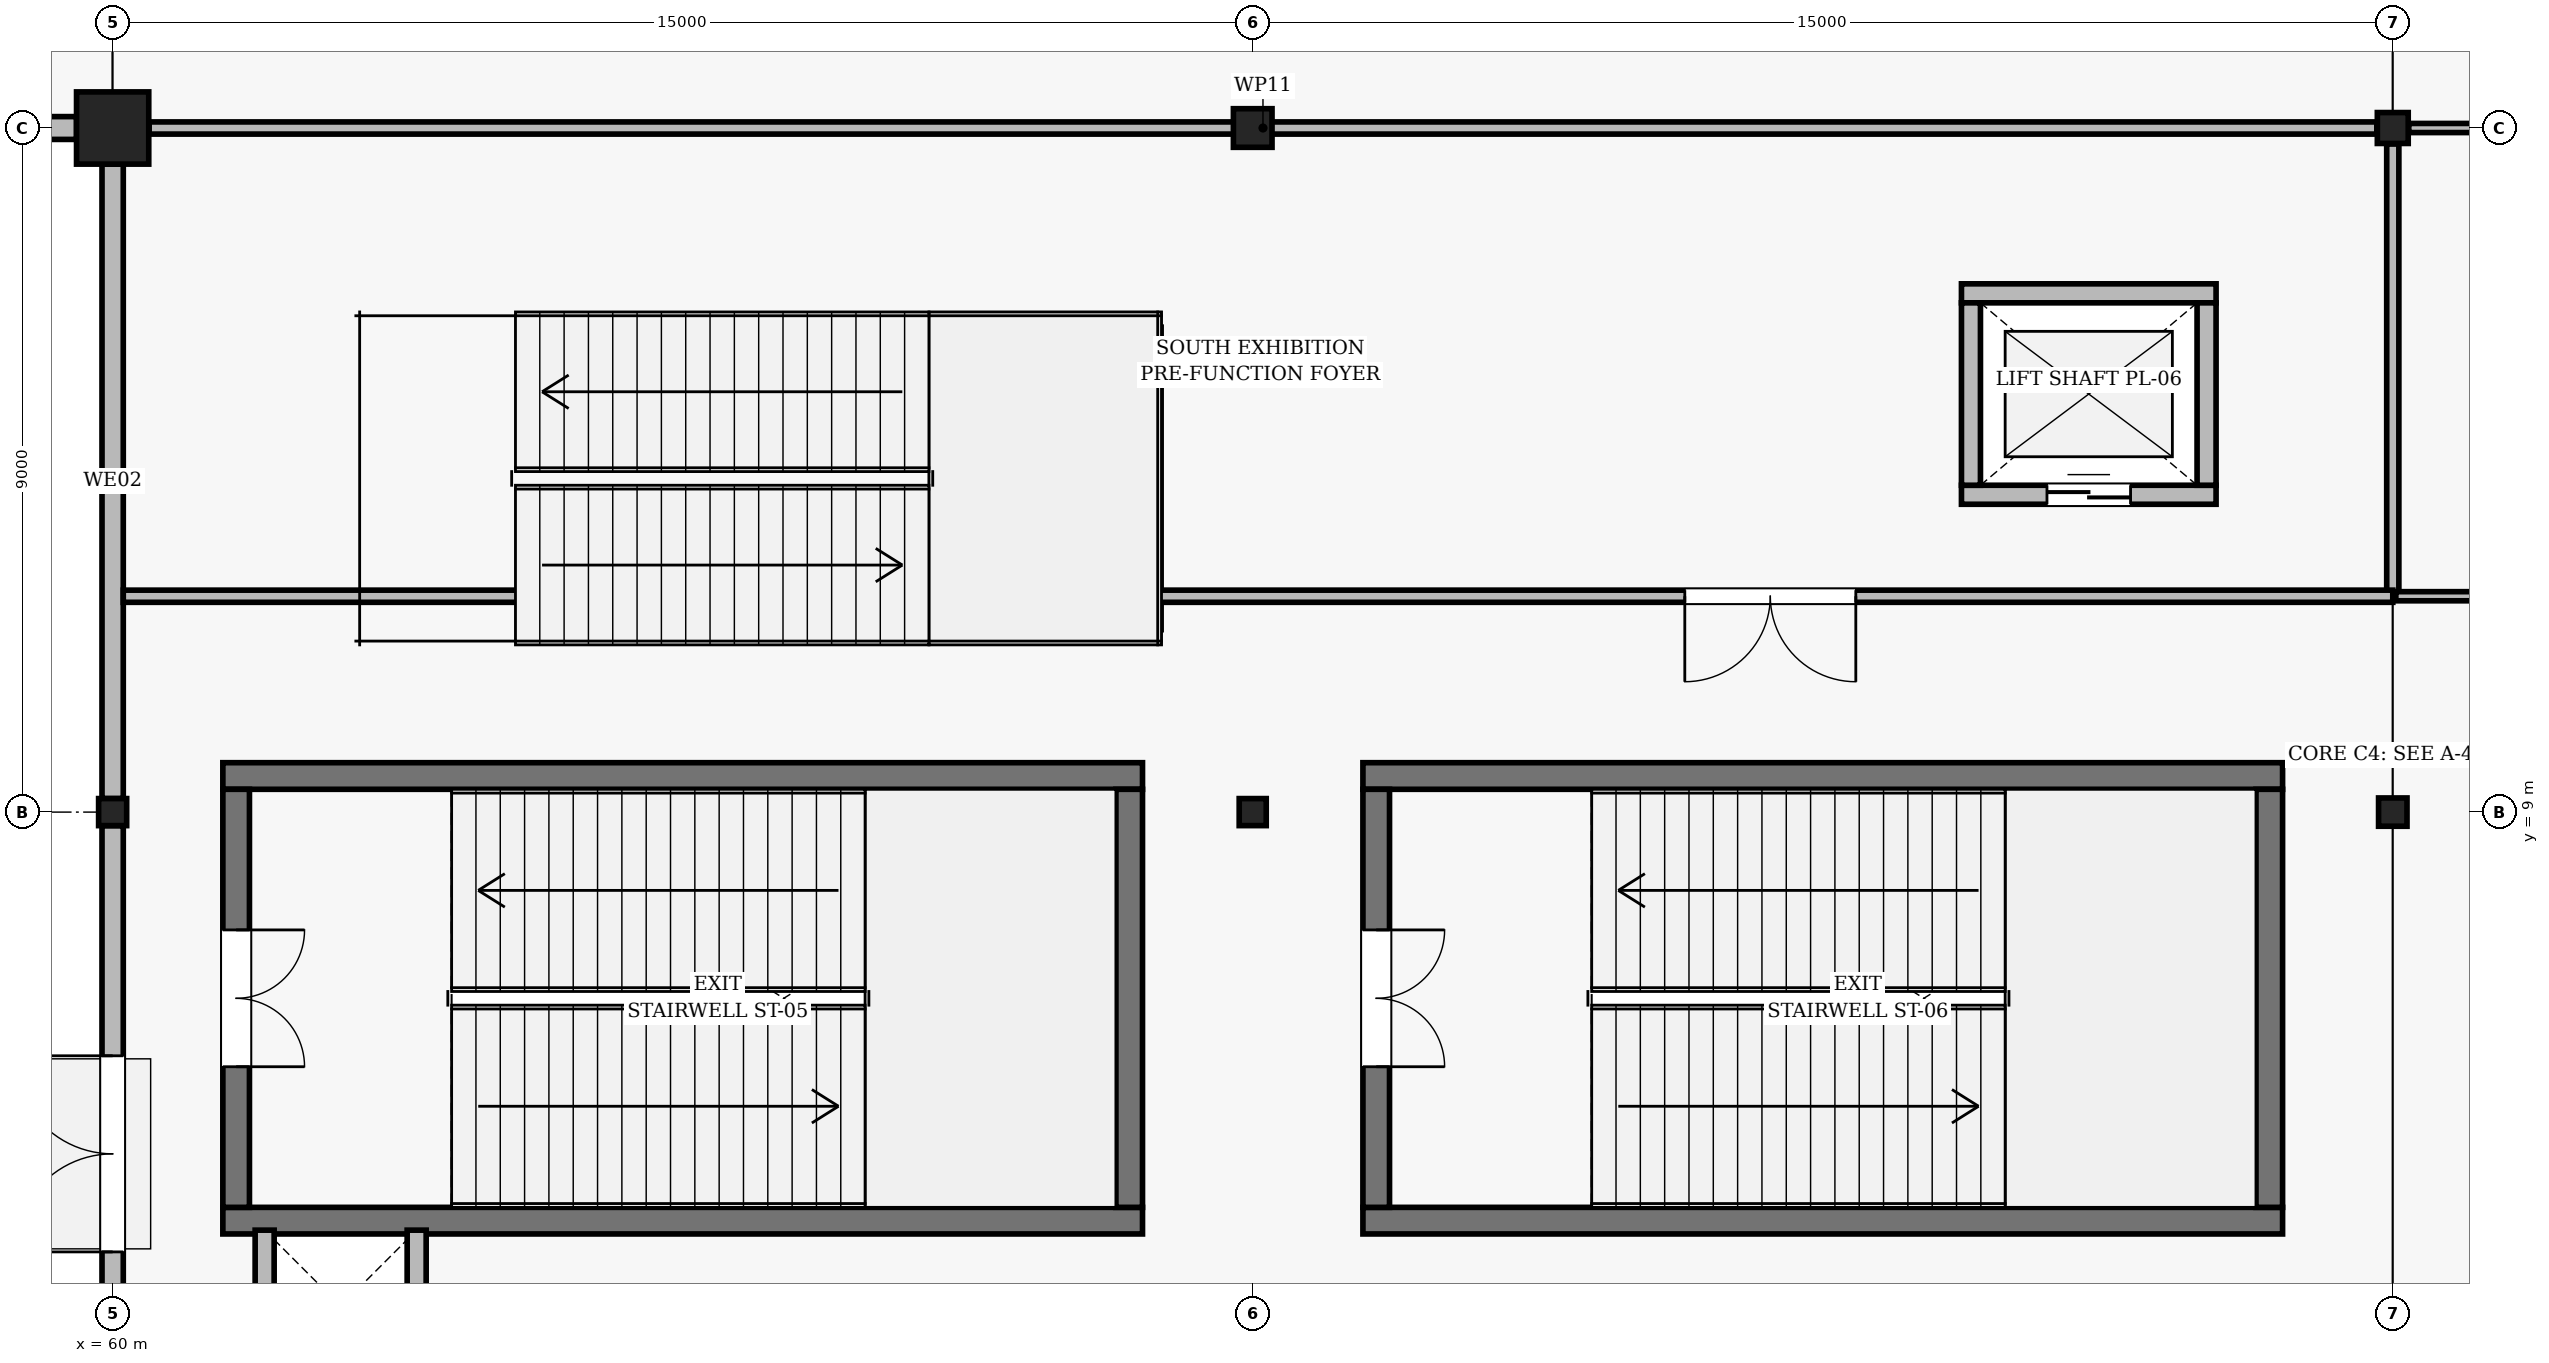
"""IFC4 building model, lengths in metres.
Left out: names, types, materials, properties, quantities, classifications, styles, units other than length and angle.
Written with IfcOpenShell. Run it as: python <this file> out.ifc"""

import sys

from ifc_helpers import new_model, si_unit, direction, frame, frame_2d, origin, origin_2d, place, context, subcontext, project, spatial, rectangle, hollow_circle, i_section, extrude, element, fill, save


model = new_model("IFC4")
c1 = context("Model", 3, precision=1e-05, world=origin(), true_north=direction((0.0, 1.0)))
c2 = subcontext(c1, "Body", "Model", "MODEL_VIEW")
j1 = project(units=[si_unit("LENGTHUNIT", "METRE"), si_unit("PLANEANGLEUNIT", "RADIAN")], contexts=[c1])
p1 = place(None, origin())
s1 = spatial("IfcSite", under=j1, at=p1, CompositionType="ELEMENT")
p2 = place(p1, origin())
s2 = spatial("IfcBuilding", under=s1, at=p2, CompositionType="ELEMENT")
p3 = place(p2, origin())
s3 = spatial("IfcBuildingStorey", under=s2, at=p3, CompositionType="ELEMENT", Elevation=0.0)
p4 = place(p3, frame((60.0, 9.0, 0.0), z_axis=(0.0, 0.0, 1.0), x_axis=(1.0, 0.0, 0.0)))
e1 = element("IfcColumn", 1, at=p4, inside=s3, PredefinedType="COLUMN", context=c2, shape_type="SweptSolid", body=[
    extrude(i_section(OverallWidth=0.369, OverallDepth=0.356, WebThickness=0.011, FlangeThickness=0.018, FilletRadius=0.015, at=origin_2d()), origin(), (0.0, 0.0, 1.0), 5.4),
])
p5 = place(p3, frame((60.0, 18.0, 0.0), z_axis=(0.0, 0.0, 1.0), x_axis=(1.0, 0.0, 0.0)))
e2 = element("IfcColumn", 2, at=p5, inside=s3, PredefinedType="COLUMN", context=c2, shape_type="SweptSolid", body=[
    extrude(rectangle(XDim=0.95, YDim=0.95, at=origin_2d()), origin(), (0.0, 0.0, 1.0), 5.4),
])
p6 = place(p3, frame((75.0, 9.0, 0.0), z_axis=(0.0, 0.0, 1.0), x_axis=(1.0, 0.0, 0.0)))
e3 = element("IfcColumn", 3, at=p6, inside=s3, PredefinedType="COLUMN", context=c2, shape_type="SweptSolid", body=[
    extrude(hollow_circle(Radius=0.178, WallThickness=0.016, at=origin_2d()), origin(), (0.0, 0.0, 1.0), 5.4),
])
p7 = place(p3, frame((75.0, 18.0, 0.0), z_axis=(0.0, 0.0, 1.0), x_axis=(1.0, 0.0, 0.0)))
e4 = element("IfcColumn", 4, at=p7, inside=s3, PredefinedType="COLUMN", context=c2, shape_type="SweptSolid", body=[
    extrude(hollow_circle(Radius=0.254, WallThickness=0.02, at=origin_2d()), origin(), (0.0, 0.0, 1.0), 5.4),
])
p8 = place(p3, frame((90.0, 9.0, 0.0), z_axis=(0.0, 0.0, 1.0), x_axis=(1.0, 0.0, 0.0)))
e5 = element("IfcColumn", 5, at=p8, inside=s3, PredefinedType="COLUMN", context=c2, shape_type="SweptSolid", body=[
    extrude(i_section(OverallWidth=0.374, OverallDepth=0.372, WebThickness=0.016, FlangeThickness=0.026, FilletRadius=0.016, at=origin_2d()), origin(), (0.0, 0.0, 1.0), 5.4),
])
p9 = place(p3, frame((90.0, 18.0, 0.0), z_axis=(0.0, 0.0, 1.0), x_axis=(1.0, 0.0, 0.0)))
e6 = element("IfcColumn", 6, at=p9, inside=s3, PredefinedType="COLUMN", context=c2, shape_type="SweptSolid", body=[
    extrude(hollow_circle(Radius=0.203, WallThickness=0.016, at=origin_2d()), origin(), (0.0, 0.0, 1.0), 5.4),
])
p10 = place(p3, frame((59.525, 18.0, 0.0), z_axis=(0.0, 0.0, 1.0), x_axis=(-1.0, 0.0, 0.0)))
e7 = element("IfcWall", 7, at=p10, inside=s3, PredefinedType="SOLIDWALL", context=c2, shape_type="SweptSolid", body=[
    extrude(rectangle(XDim=14.322, YDim=0.3, at=frame_2d((7.161, 0.0))), origin(), (0.0, 0.0, 1.0), 4.919),
])
p11 = place(p10, frame((2.656, 0.0, 0.0)))
e8 = element("IfcOpeningElement", 8, at=p11, cuts=e7, PredefinedType="OPENING", context=c2, shape_type="SweptSolid", body=[
    extrude(rectangle(XDim=2.75, YDim=2.58, at=frame_2d((1.375, 1.29))), frame((0.0, 0.16, 0.0), z_axis=(0.0, -1.0, 0.0), x_axis=(1.0, 0.0, 0.0)), (0.0, 0.0, 1.0), 0.32),
])
p12 = place(p10, frame((8.866, 0.0, 0.0)))
e9 = element("IfcOpeningElement", 9, at=p12, cuts=e7, PredefinedType="OPENING", context=c2, shape_type="SweptSolid", body=[
    extrude(rectangle(XDim=2.85, YDim=2.62, at=frame_2d((1.425, 1.31))), frame((0.0, 0.16, 0.0), z_axis=(0.0, -1.0, 0.0), x_axis=(1.0, 0.0, 0.0)), (0.0, 0.0, 1.0), 0.32),
])
p13 = place(p3, frame((60.0, 0.186, 0.0), z_axis=(0.0, 0.0, 1.0), x_axis=(0.0, 1.0, 0.0)))
e10 = element("IfcWall", 10, at=p13, inside=s3, PredefinedType="SOLIDWALL", context=c2, shape_type="SweptSolid", body=[
    extrude(rectangle(XDim=8.636, YDim=0.28, at=frame_2d((4.318, 0.0))), origin(), (0.0, 0.0, 1.0), 4.392),
])
p14 = place(p13, frame((3.028, 0.0, 0.0)))
e11 = element("IfcOpeningElement", 11, at=p14, cuts=e10, PredefinedType="OPENING", context=c2, shape_type="SweptSolid", body=[
    extrude(rectangle(XDim=2.58, YDim=2.48, at=frame_2d((1.29, 1.24))), frame((0.0, 0.15, 0.0), z_axis=(0.0, -1.0, 0.0), x_axis=(1.0, 0.0, 0.0)), (0.0, 0.0, 1.0), 0.3),
])
p15 = place(p3, frame((60.0, 9.178, 0.0), z_axis=(0.0, 0.0, 1.0), x_axis=(0.0, 1.0, 0.0)))
e12 = element("IfcWall", 12, at=p15, inside=s3, PredefinedType="SOLIDWALL", context=c2, shape_type="SweptSolid", body=[
    extrude(rectangle(XDim=8.347, YDim=0.28, at=frame_2d((4.173, 0.0))), origin(), (0.0, 0.0, 1.0), 4.47),
])
for number, where, z_axis, x_axis in (
    (13, (61.45, 3.625, 0.0), (0.0, 0.0, 1.0), (1.0, 0.0, 0.0)),
    (14, (73.55, 9.475, 0.0), (0.0, 0.0, 1.0), (-1.0, 0.0, 0.0)),
):
    element("IfcWall", number, at=place(p3, frame(where, z_axis=z_axis, x_axis=x_axis)), inside=s3, PredefinedType="SHEAR", context=c2, shape_type="SweptSolid", body=[
        extrude(rectangle(XDim=12.1, YDim=0.35, at=frame_2d((6.05, 0.0))), origin(), (0.0, 0.0, 1.0), 5.18),
    ])
p16 = place(p3, frame((61.625, 9.3, 0.0), z_axis=(0.0, 0.0, 1.0), x_axis=(0.0, -1.0, 0.0)))
e15 = element("IfcWall", 15, at=p16, inside=s3, PredefinedType="SHEAR", context=c2, shape_type="SweptSolid", body=[
    extrude(rectangle(XDim=5.5, YDim=0.35, at=frame_2d((2.75, 0.0))), origin(), (0.0, 0.0, 1.0), 5.18),
])
p17 = place(p16, frame((1.85, 0.0, 0.0)))
e16 = element("IfcOpeningElement", 16, at=p17, cuts=e15, PredefinedType="OPENING", context=c2, shape_type="SweptSolid", body=[
    extrude(rectangle(XDim=1.8, YDim=2.2, at=frame_2d((0.9, 1.1))), frame((0.0, 0.185, 0.0), z_axis=(0.0, -1.0, 0.0), x_axis=(1.0, 0.0, 0.0)), (0.0, 0.0, 1.0), 0.37),
])
p18 = place(p3, frame((73.375, 3.8, 0.0), z_axis=(0.0, 0.0, 1.0), x_axis=(0.0, 1.0, 0.0)))
e17 = element("IfcWall", 17, at=p18, inside=s3, PredefinedType="SHEAR", context=c2, shape_type="SweptSolid", body=[
    extrude(rectangle(XDim=5.5, YDim=0.35, at=frame_2d((2.75, 0.0))), origin(), (0.0, 0.0, 1.0), 5.18),
])
for number, where, z_axis, x_axis in (
    (18, (76.45, 3.625, 0.0), (0.0, 0.0, 1.0), (1.0, 0.0, 0.0)),
    (19, (88.55, 9.475, 0.0), (0.0, 0.0, 1.0), (-1.0, 0.0, 0.0)),
):
    element("IfcWall", number, at=place(p3, frame(where, z_axis=z_axis, x_axis=x_axis)), inside=s3, PredefinedType="SHEAR", context=c2, shape_type="SweptSolid", body=[
        extrude(rectangle(XDim=12.1, YDim=0.35, at=frame_2d((6.05, 0.0))), origin(), (0.0, 0.0, 1.0), 5.18),
    ])
p19 = place(p3, frame((76.625, 9.3, 0.0), z_axis=(0.0, 0.0, 1.0), x_axis=(0.0, -1.0, 0.0)))
e20 = element("IfcWall", 20, at=p19, inside=s3, PredefinedType="SHEAR", context=c2, shape_type="SweptSolid", body=[
    extrude(rectangle(XDim=5.5, YDim=0.35, at=frame_2d((2.75, 0.0))), origin(), (0.0, 0.0, 1.0), 5.18),
])
p20 = place(p19, frame((1.85, 0.0, 0.0)))
e21 = element("IfcOpeningElement", 21, at=p20, cuts=e20, PredefinedType="OPENING", context=c2, shape_type="SweptSolid", body=[
    extrude(rectangle(XDim=1.8, YDim=2.2, at=frame_2d((0.9, 1.1))), frame((0.0, 0.185, 0.0), z_axis=(0.0, -1.0, 0.0), x_axis=(1.0, 0.0, 0.0)), (0.0, 0.0, 1.0), 0.37),
])
p21 = place(p3, frame((88.375, 3.8, 0.0), z_axis=(0.0, 0.0, 1.0), x_axis=(0.0, 1.0, 0.0)))
e22 = element("IfcWall", 22, at=p21, inside=s3, PredefinedType="SHEAR", context=c2, shape_type="SweptSolid", body=[
    extrude(rectangle(XDim=5.5, YDim=0.35, at=frame_2d((2.75, 0.0))), origin(), (0.0, 0.0, 1.0), 5.18),
])
for number, where, z_axis, x_axis in (
    (23, (70.82, 11.4, 0.0), (0.0, 0.0, 1.0), (1.0, 0.0, 0.0)),
    (24, (70.82, 15.38, 0.0), (0.0, 0.0, 1.0), (1.0, 0.0, 0.0)),
):
    element("IfcWall", number, at=place(p3, frame(where, z_axis=z_axis, x_axis=x_axis)), inside=s3, PredefinedType="SHEAR", context=c2, shape_type="SweptSolid", body=[
        extrude(rectangle(XDim=2.8, YDim=0.35, at=frame_2d((1.4, 0.0))), origin(), (0.0, 0.0, 1.0), 5.18),
    ])
p22 = place(p3, frame((73.62, 11.4, 0.0), z_axis=(0.0, 0.0, 1.0), x_axis=(0.0, 1.0, 0.0)))
e25 = element("IfcWall", 25, at=p22, inside=s3, PredefinedType="SHEAR", context=c2, shape_type="SweptSolid", body=[
    extrude(rectangle(XDim=3.98, YDim=0.35, at=frame_2d((1.99, 0.0))), origin(), (0.0, 0.0, 1.0), 5.18),
])
p23 = place(p3, frame((84.325, 13.175, 0.0), z_axis=(0.0, 0.0, 1.0), x_axis=(1.0, 0.0, 0.0)))
e26 = element("IfcWall", 26, at=p23, inside=s3, PredefinedType="SOLIDWALL", context=c2, shape_type="SweptSolid", body=[
    extrude(rectangle(XDim=3.35, YDim=0.25, at=frame_2d((1.675, 0.0))), origin(), (0.0, 0.0, 1.0), 5.18),
])
p24 = place(p23, frame((1.125, 0.0, 0.0)))
e27 = element("IfcOpeningElement", 27, at=p24, cuts=e26, PredefinedType="OPENING", context=c2, shape_type="SweptSolid", body=[
    extrude(rectangle(XDim=1.1, YDim=2.2, at=frame_2d((0.55, 1.1))), frame((0.0, 0.135, 0.0), z_axis=(0.0, -1.0, 0.0), x_axis=(1.0, 0.0, 0.0)), (0.0, 0.0, 1.0), 0.27),
])
p25 = place(p3, frame((87.675, 15.825, 0.0), z_axis=(0.0, 0.0, 1.0), x_axis=(-1.0, 0.0, 0.0)))
e28 = element("IfcWall", 28, at=p25, inside=s3, PredefinedType="SOLIDWALL", context=c2, shape_type="SweptSolid", body=[
    extrude(rectangle(XDim=3.35, YDim=0.25, at=frame_2d((1.675, 0.0))), origin(), (0.0, 0.0, 1.0), 5.18),
])
for number, where, z_axis, x_axis in (
    (29, (84.45, 15.7, 0.0), (0.0, 0.0, 1.0), (0.0, -1.0, 0.0)),
    (30, (87.55, 13.3, 0.0), (0.0, 0.0, 1.0), (0.0, 1.0, 0.0)),
):
    element("IfcWall", number, at=place(p3, frame(where, z_axis=z_axis, x_axis=x_axis)), inside=s3, PredefinedType="SOLIDWALL", context=c2, shape_type="SweptSolid", body=[
        extrude(rectangle(XDim=2.4, YDim=0.25, at=frame_2d((1.2, 0.0))), origin(), (0.0, 0.0, 1.0), 5.18),
    ])
p26 = place(p3, frame((60.48, 18.0, 0.0), z_axis=(0.0, 0.0, 1.0), x_axis=(1.0, 0.0, 0.0)))
e31 = element("IfcWall", 31, at=p26, inside=s3, PredefinedType="PARTITIONING", context=c2, shape_type="SweptSolid", body=[
    extrude(rectangle(XDim=29.31, YDim=0.16, at=frame_2d((14.655, 0.0))), origin(), (0.0, 0.0, 1.0), 4.481),
])
p27 = place(p3, frame((90.0, 17.79, 0.0), z_axis=(0.0, 0.0, 1.0), x_axis=(0.0, -1.0, 0.0)))
e32 = element("IfcWall", 32, at=p27, inside=s3, PredefinedType="PARTITIONING", context=c2, shape_type="SweptSolid", body=[
    extrude(rectangle(XDim=5.95, YDim=0.16, at=frame_2d((2.975, 0.0))), origin(), (0.0, 0.0, 1.0), 4.554),
])
p28 = place(p3, frame((90.0, 11.84, 0.0), z_axis=(0.0, 0.0, 1.0), x_axis=(-1.0, 0.0, 0.0)))
e33 = element("IfcWall", 33, at=p28, inside=s3, PredefinedType="PARTITIONING", context=c2, shape_type="SweptSolid", body=[
    extrude(rectangle(XDim=16.38, YDim=0.16, at=frame_2d((8.19, 0.0))), origin(), (0.0, 0.0, 1.0), 4.481),
])
p29 = place(p28, frame((7.065, 0.0, 0.0)))
e34 = element("IfcOpeningElement", 34, at=p29, cuts=e33, PredefinedType="OPENING", context=c2, shape_type="SweptSolid", body=[
    extrude(rectangle(XDim=2.25, YDim=2.4, at=frame_2d((1.125, 1.2))), frame((0.0, 0.09, 0.0), z_axis=(0.0, -1.0, 0.0), x_axis=(1.0, 0.0, 0.0)), (0.0, 0.0, 1.0), 0.18),
])
p30 = place(p3, frame((70.82, 11.84, 0.0), z_axis=(0.0, 0.0, 1.0), x_axis=(-1.0, 0.0, 0.0)))
e35 = element("IfcWall", 35, at=p30, inside=s3, PredefinedType="PARTITIONING", context=c2, shape_type="SweptSolid", body=[
    extrude(rectangle(XDim=10.68, YDim=0.16, at=frame_2d((5.34, 0.0))), origin(), (0.0, 0.0, 1.0), 4.47),
])
p31 = place(p3, frame((99.35, 11.84, 0.0), z_axis=(0.0, 0.0, 1.0), x_axis=(-1.0, 0.0, 0.0)))
e36 = element("IfcWall", 36, at=p31, inside=s3, PredefinedType="PARTITIONING", context=c2, shape_type="SweptSolid", body=[
    extrude(rectangle(XDim=9.31, YDim=0.12, at=frame_2d((4.655, 0.0))), origin(), (0.0, 0.0, 1.0), 4.554),
])
p32 = place(p3, frame((90.21, 18.0, 0.0), z_axis=(0.0, 0.0, 1.0), x_axis=(1.0, 0.0, 0.0)))
e37 = element("IfcWall", 37, at=p32, inside=s3, PredefinedType="PARTITIONING", context=c2, shape_type="SweptSolid", body=[
    extrude(rectangle(XDim=29.58, YDim=0.12, at=frame_2d((14.79, 0.0))), origin(), (0.0, 0.0, 1.0), 4.392),
])
for number, where, z_axis, x_axis in (
    (38, (62.0, 3.5, 0.0), (0.0, 0.0, 1.0), (0.0, -1.0, 0.0)),
    (39, (64.0, 1.5, 0.0), (0.0, 0.0, 1.0), (0.0, 1.0, 0.0)),
):
    element("IfcWall", number, at=place(p3, frame(where, z_axis=z_axis, x_axis=x_axis)), inside=s3, PredefinedType="SOLIDWALL", context=c2, shape_type="SweptSolid", body=[
        extrude(rectangle(XDim=2.0, YDim=0.25, at=frame_2d((1.0, 0.0))), origin(), (0.0, 0.0, 1.0), 4.83),
    ])
p33 = place(p14, origin())
e40 = element("IfcDoor", 40, at=p33, inside=s3, OperationType="DOUBLE_DOOR_SINGLE_SWING", PredefinedType="DOOR", context=c2, shape_type="SweptSolid", body=[
    extrude(rectangle(XDim=2.58, YDim=2.48, at=frame_2d((1.29, 1.24))), frame((0.0, 0.025, 0.0), z_axis=(0.0, -1.0, 0.0), x_axis=(1.0, 0.0, 0.0)), (0.0, 0.0, 1.0), 0.05),
])
fill(e11, e40)
p34 = place(p17, origin())
e41 = element("IfcDoor", 41, at=p34, inside=s3, OperationType="DOUBLE_DOOR_SINGLE_SWING", PredefinedType="DOOR", context=c2, shape_type="SweptSolid", body=[
    extrude(rectangle(XDim=1.8, YDim=2.2, at=frame_2d((0.9, 1.1))), frame((0.0, 0.025, 0.0), z_axis=(0.0, -1.0, 0.0), x_axis=(1.0, 0.0, 0.0)), (0.0, 0.0, 1.0), 0.05),
])
fill(e16, e41)
p35 = place(p20, origin())
e42 = element("IfcDoor", 42, at=p35, inside=s3, OperationType="DOUBLE_DOOR_SINGLE_SWING", PredefinedType="DOOR", context=c2, shape_type="SweptSolid", body=[
    extrude(rectangle(XDim=1.8, YDim=2.2, at=frame_2d((0.9, 1.1))), frame((0.0, 0.025, 0.0), z_axis=(0.0, -1.0, 0.0), x_axis=(1.0, 0.0, 0.0)), (0.0, 0.0, 1.0), 0.05),
])
fill(e21, e42)
p36 = place(p24, origin())
e43 = element("IfcDoor", 43, at=p36, inside=s3, OperationType="DOUBLE_DOOR_SLIDING", PredefinedType="DOOR", context=c2, shape_type="SweptSolid", body=[
    extrude(rectangle(XDim=1.1, YDim=2.2, at=frame_2d((0.55, 1.1))), frame((0.0, 0.025, 0.0), z_axis=(0.0, -1.0, 0.0), x_axis=(1.0, 0.0, 0.0)), (0.0, 0.0, 1.0), 0.05),
])
fill(e27, e43)
p37 = place(p29, origin())
e44 = element("IfcDoor", 44, at=p37, inside=s3, OperationType="DOUBLE_DOOR_SINGLE_SWING", PredefinedType="DOOR", context=c2, shape_type="SweptSolid", body=[
    extrude(rectangle(XDim=2.25, YDim=2.4, at=frame_2d((1.125, 1.2))), frame((0.0, 0.025, 0.0), z_axis=(0.0, -1.0, 0.0), x_axis=(1.0, 0.0, 0.0)), (0.0, 0.0, 1.0), 0.05),
])
fill(e34, e44)
save(model, sys.argv[1])
